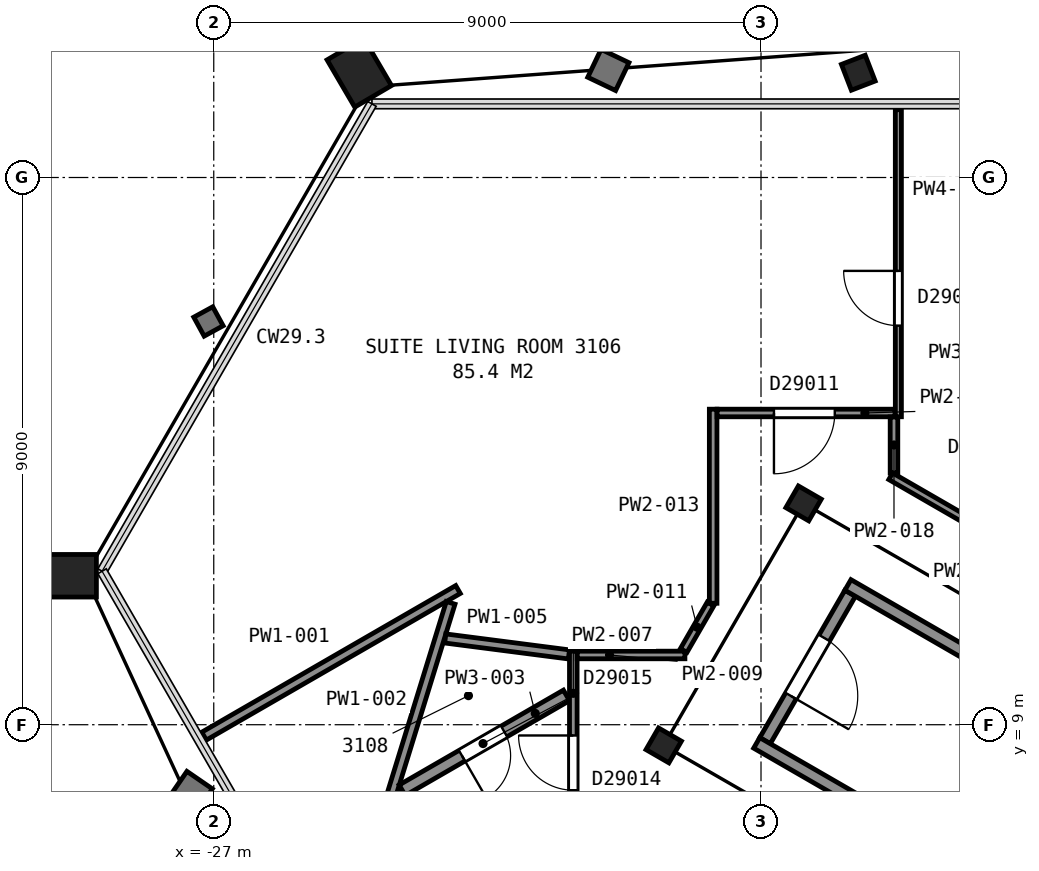
"""IFC4 building model, lengths in metres.
Left out: names, types, materials, properties, quantities, classifications, styles, units other than length and angle.
Written with IfcOpenShell. Run it as: python <this file> out.ifc"""

import sys

from ifc_helpers import new_model, si_unit, direction, frame, frame_2d, origin, origin_2d, place, context, subcontext, project, spatial, rectangle, hollow_rectangle, i_section, extrude, element, fill, save


model = new_model("IFC4")
c1 = context("Model", 3, precision=1e-05, world=origin(), true_north=direction((0.0, 1.0)))
c2 = subcontext(c1, "Body", "Model", "MODEL_VIEW")
j1 = project(units=[si_unit("LENGTHUNIT", "METRE"), si_unit("PLANEANGLEUNIT", "RADIAN")], contexts=[c1])
p1 = place(None, origin())
s1 = spatial("IfcSite", under=j1, at=p1, CompositionType="ELEMENT")
p2 = place(p1, origin())
s2 = spatial("IfcBuilding", under=s1, at=p2, CompositionType="ELEMENT")
p3 = place(p2, frame((0.0, 0.0, 128.8)))
s3 = spatial("IfcBuildingStorey", under=s2, at=p3, CompositionType="ELEMENT", Elevation=128.8)
p4 = place(p3, frame((-16.313, 19.498, 0.04), z_axis=(-0.073399283301, 0.190322100919, 0.978973974686), x_axis=(0.997200375036, -5.0957711e-05, 0.074775727554)))
e1 = element("IfcColumn", 1, at=p4, inside=s3, PredefinedType="COLUMN", context=c2, shape_type="SweptSolid", body=[
    extrude(i_section(OverallWidth=0.419, OverallDepth=0.455, WebThickness=0.042, FlangeThickness=0.068, FilletRadius=0.015, at=origin_2d()), origin(), (0.0, 0.0, 1.0), 3.596),
])
p5 = place(p3, frame((-24.479, 19.505, 0.075), z_axis=(-0.111147334109, 0.189640824097, 0.975542222539), x_axis=(0.49667863065, 0.860838994328, -0.110754519997)))
e2 = element("IfcColumn", 2, at=p5, inside=s3, PredefinedType="COLUMN", context=c2, shape_type="SweptSolid", body=[
    extrude(hollow_rectangle(XDim=0.7, YDim=0.9, WallThickness=0.065, at=origin_2d()), origin(), (0.0, 0.0, 1.0), 3.536),
])
p6 = place(p3, frame((-29.127, 11.45, 0.075), z_axis=(-0.219480980807, 0.0, 0.975616778794), x_axis=(0.496869692208, 0.860596286786, 0.111778978949)))
e3 = element("IfcColumn", 3, at=p6, inside=s3, PredefinedType="COLUMN", context=c2, shape_type="SweptSolid", body=[
    extrude(hollow_rectangle(XDim=0.7, YDim=0.9, WallThickness=0.065, at=origin_2d()), origin(), (0.0, 0.0, 1.0), 3.536),
])
for number, where, z_axis, x_axis in (
    (4, (-17.3, 12.64, 0.0), (0.0, 0.0, 1.0), (0.5, 0.866, 0.0)),
    (5, (-19.6, 8.66, 0.0), (0.0, 0.0, 1.0), (0.5, 0.866, 0.0)),
):
    element("IfcColumn", number, at=place(p3, frame(where, z_axis=z_axis, x_axis=x_axis)), inside=s3, PredefinedType="COLUMN", context=c2, shape_type="SweptSolid", body=[
        extrude(i_section(OverallWidth=0.411, OverallDepth=0.434, WebThickness=0.036, FlangeThickness=0.057, FilletRadius=0.015, at=origin_2d()), origin(), (0.0, 0.0, 1.0), 3.6),
    ])
p7 = place(p3, frame((-16.534, 11.162, 0.0), z_axis=(0.0, 0.0, 1.0), x_axis=(-0.49998411664, -0.866034573852, 0.0)))
e6 = element("IfcWall", 6, at=p7, inside=s3, PredefinedType="PARTITIONING", context=c2, shape_type="SweptSolid", body=[
    extrude(rectangle(XDim=2.8, YDim=0.2, at=frame_2d((1.4, 0.0))), origin(), (0.0, 0.0, 1.0), 3.35),
])
p8 = place(p7, frame((0.85, 0.0, 0.0)))
e7 = element("IfcOpeningElement", 7, at=p8, cuts=e6, PredefinedType="OPENING", context=c2, shape_type="SweptSolid", body=[
    extrude(rectangle(XDim=1.1, YDim=2.1, at=frame_2d((0.55, 1.05))), frame((0.0, 0.11, 0.0), z_axis=(0.0, -1.0, 0.0), x_axis=(1.0, 0.0, 0.0)), (0.0, 0.0, 1.0), 0.22),
])
for number, where, z_axis, x_axis in (
    (8, (-7.678, 2.701, 0.0), (0.0, 0.0, 1.0), (-0.866, 0.5, 0.0)),
    (9, (-6.178, 5.299, 0.0), (0.0, 0.0, 1.0), (-0.866, 0.5, 0.0)),
):
    element("IfcWall", number, at=place(p3, frame(where, z_axis=z_axis, x_axis=x_axis)), inside=s3, PredefinedType="PARTITIONING", context=c2, shape_type="SweptSolid", body=[
        extrude(rectangle(XDim=12.0, YDim=0.2, at=frame_2d((6.0, 0.0))), origin(), (0.0, 0.0, 1.0), 3.35),
    ])
p9 = place(p3, frame((-27.16, 8.812, 0.0), z_axis=(0.0, 0.0, 1.0), x_axis=(0.866019508262, 0.500010211206, 0.0)))
e10 = element("IfcWall", 10, at=p9, inside=s3, PredefinedType="PARTITIONING", context=c2, shape_type="SweptSolid", body=[
    extrude(rectangle(XDim=4.823, YDim=0.15, at=frame_2d((2.411, 0.0))), origin(), (0.0, 0.0, 1.0), 2.613),
])
p10 = place(p3, frame((-24.087, 7.815, 0.0), z_axis=(0.0, 0.0, 1.0), x_axis=(0.294507330173, 0.955649220412, 0.0)))
e11 = element("IfcWall", 11, at=p10, inside=s3, PredefinedType="PARTITIONING", context=c2, shape_type="SweptSolid", body=[
    extrude(rectangle(XDim=3.337, YDim=0.15, at=frame_2d((1.669, 0.0))), origin(), (0.0, 0.0, 1.0), 2.613),
])
p11 = place(p3, frame((-23.901, 7.923, 0.0), z_axis=(0.0, 0.0, 1.0), x_axis=(0.866072196304, 0.49991894422, 0.0)))
e12 = element("IfcWall", 12, at=p11, inside=s3, PredefinedType="PARTITIONING", context=c2, shape_type="SweptSolid", body=[
    extrude(rectangle(XDim=3.119, YDim=0.2, at=frame_2d((1.56, 0.0))), origin(), (0.0, 0.0, 1.0), 2.613),
])
p12 = place(p11, frame((1.135, 0.0, 0.0)))
e13 = element("IfcOpeningElement", 13, at=p12, cuts=e12, PredefinedType="OPENING", context=c2, shape_type="SweptSolid", body=[
    extrude(rectangle(XDim=0.8, YDim=2.1, at=frame_2d((0.4, 1.05))), frame((0.0, 0.11, 0.0), z_axis=(0.0, -1.0, 0.0), x_axis=(1.0, 0.0, 0.0)), (0.0, 0.0, 1.0), 0.22),
])
p13 = place(p3, frame((-23.193, 10.419, 0.0), z_axis=(0.0, 0.0, 1.0), x_axis=(0.991775429183, -0.127990226455, 0.0)))
e14 = element("IfcWall", 14, at=p13, inside=s3, PredefinedType="PARTITIONING", context=c2, shape_type="SweptSolid", body=[
    extrude(rectangle(XDim=2.051, YDim=0.15, at=frame_2d((1.025, 0.0))), origin(), (0.0, 0.0, 1.0), 2.613),
])
p14 = place(p3, frame((-21.087, 7.111, 0.0), z_axis=(0.0, 0.0, 1.0), x_axis=(0.0, 1.0, 0.0)))
e15 = element("IfcWall", 15, at=p14, inside=s3, PredefinedType="PARTITIONING", context=c2, shape_type="SweptSolid", body=[
    extrude(rectangle(XDim=3.099, YDim=0.125, at=frame_2d((1.549, 0.0))), origin(), (0.0, 0.0, 1.0), 2.613),
])
p15 = place(p14, frame((0.812, 0.0, 0.0)))
e16 = element("IfcOpeningElement", 16, at=p15, cuts=e15, PredefinedType="OPENING", context=c2, shape_type="SweptSolid", body=[
    extrude(rectangle(XDim=0.9, YDim=2.1, at=frame_2d((0.45, 1.05))), frame((0.0, 0.073, 0.0), z_axis=(0.0, -1.0, 0.0), x_axis=(1.0, 0.0, 0.0)), (0.0, 0.0, 1.0), 0.145),
])
p16 = place(p3, frame((-21.022, 10.147, 0.0), z_axis=(0.0, 0.0, 1.0), x_axis=(1.0, 0.0, 0.0)))
e17 = element("IfcWall", 17, at=p16, inside=s3, PredefinedType="PARTITIONING", context=c2, shape_type="SweptSolid", body=[
    extrude(rectangle(XDim=1.771, YDim=0.125, at=frame_2d((0.885, 0.0))), origin(), (0.0, 0.0, 1.0), 2.613),
])
p17 = place(p3, frame((-19.271, 10.221, 0.0), z_axis=(0.0, 0.0, 1.0), x_axis=(0.499881837328, 0.866093614288, 0.0)))
e18 = element("IfcWall", 18, at=p17, inside=s3, PredefinedType="PARTITIONING", context=c2, shape_type="SweptSolid", body=[
    extrude(rectangle(XDim=0.884, YDim=0.125, at=frame_2d((0.442, 0.0))), origin(), (0.0, 0.0, 1.0), 2.613),
])
p18 = place(p3, frame((-18.787, 10.998, 0.0), z_axis=(0.0, 0.0, 1.0), x_axis=(0.0, 1.0, 0.0)))
e19 = element("IfcWall", 19, at=p18, inside=s3, PredefinedType="PARTITIONING", context=c2, shape_type="SweptSolid", body=[
    extrude(rectangle(XDim=3.192, YDim=0.125, at=frame_2d((1.596, 0.0))), origin(), (0.0, 0.0, 1.0), 2.613),
])
p19 = place(p3, frame((-18.722, 14.127, 0.0), z_axis=(0.0, 0.0, 1.0), x_axis=(1.0, 0.0, 0.0)))
e20 = element("IfcWall", 20, at=p19, inside=s3, PredefinedType="PARTITIONING", context=c2, shape_type="SweptSolid", body=[
    extrude(rectangle(XDim=2.927, YDim=0.125, at=frame_2d((1.463, 0.0))), origin(), (0.0, 0.0, 1.0), 2.613),
])
p20 = place(p19, frame((0.935, 0.0, 0.0)))
e21 = element("IfcOpeningElement", 21, at=p20, cuts=e20, PredefinedType="OPENING", context=c2, shape_type="SweptSolid", body=[
    extrude(rectangle(XDim=1.0, YDim=2.1, at=frame_2d((0.5, 1.05))), frame((0.0, 0.073, 0.0), z_axis=(0.0, -1.0, 0.0), x_axis=(1.0, 0.0, 0.0)), (0.0, 0.0, 1.0), 0.145),
])
p21 = place(p3, frame((-15.813, 13.14, 0.0), z_axis=(0.0, 0.0, 1.0), x_axis=(0.0, 1.0, 0.0)))
e22 = element("IfcWall", 22, at=p21, inside=s3, PredefinedType="PARTITIONING", context=c2, shape_type="SweptSolid", body=[
    extrude(rectangle(XDim=0.922, YDim=0.125, at=frame_2d((0.461, 0.0))), origin(), (0.0, 0.0, 1.0), 2.613),
])
p22 = place(p3, frame((-15.867, 13.086, 0.0), z_axis=(0.0, 0.0, 1.0), x_axis=(0.866070231021, -0.499922348909, 0.0)))
e23 = element("IfcWall", 23, at=p22, inside=s3, PredefinedType="PARTITIONING", context=c2, shape_type="SweptSolid", body=[
    extrude(rectangle(XDim=4.088, YDim=0.125, at=frame_2d((2.044, 0.0))), origin(), (0.0, 0.0, 1.0), 2.613),
])
p23 = place(p3, frame((-15.741, 19.115, 0.0), z_axis=(0.0, 0.0, 1.0), x_axis=(0.0, -1.0, 0.0)))
e24 = element("IfcWall", 24, at=p23, inside=s3, PredefinedType="PARTITIONING", context=c2, shape_type="SweptSolid", body=[
    extrude(rectangle(XDim=5.05, YDim=0.1, at=frame_2d((2.525, 0.0))), origin(), (0.0, 0.0, 1.0), 2.613),
])
p24 = place(p23, frame((2.651, 0.0, 0.0)))
e25 = element("IfcOpeningElement", 25, at=p24, cuts=e24, PredefinedType="OPENING", context=c2, shape_type="SweptSolid", body=[
    extrude(rectangle(XDim=0.9, YDim=2.1, at=frame_2d((0.45, 1.05))), frame((0.0, 0.06, 0.0), z_axis=(0.0, -1.0, 0.0), x_axis=(1.0, 0.0, 0.0)), (0.0, 0.0, 1.0), 0.12),
])
p25 = place(p8, origin())
e26 = element("IfcDoor", 26, at=p25, inside=s3, OperationType="SINGLE_SWING_RIGHT", PredefinedType="DOOR", context=c2, shape_type="SweptSolid", body=[
    extrude(rectangle(XDim=1.1, YDim=2.1, at=frame_2d((0.55, 1.05))), frame((0.0, 0.025, 0.0), z_axis=(0.0, -1.0, 0.0), x_axis=(1.0, 0.0, 0.0)), (0.0, 0.0, 1.0), 0.05),
])
fill(e7, e26)
p26 = place(p12, origin())
e27 = element("IfcDoor", 27, at=p26, inside=s3, OperationType="SINGLE_SWING_LEFT", PredefinedType="DOOR", context=c2, shape_type="SweptSolid", body=[
    extrude(rectangle(XDim=0.8, YDim=2.1, at=frame_2d((0.4, 1.05))), frame((0.0, 0.025, 0.0), z_axis=(0.0, -1.0, 0.0), x_axis=(1.0, 0.0, 0.0)), (0.0, 0.0, 1.0), 0.05),
])
fill(e13, e27)
p27 = place(p15, origin())
e28 = element("IfcDoor", 28, at=p27, inside=s3, OperationType="SINGLE_SWING_RIGHT", PredefinedType="DOOR", context=c2, shape_type="SweptSolid", body=[
    extrude(rectangle(XDim=0.9, YDim=2.1, at=frame_2d((0.45, 1.05))), frame((0.0, 0.025, 0.0), z_axis=(0.0, -1.0, 0.0), x_axis=(1.0, 0.0, 0.0)), (0.0, 0.0, 1.0), 0.05),
])
fill(e16, e28)
p28 = place(p20, origin())
e29 = element("IfcDoor", 29, at=p28, inside=s3, OperationType="SINGLE_SWING_LEFT", PredefinedType="DOOR", context=c2, shape_type="SweptSolid", body=[
    extrude(rectangle(XDim=1.0, YDim=2.1, at=frame_2d((0.5, 1.05))), frame((0.0, 0.025, 0.0), z_axis=(0.0, -1.0, 0.0), x_axis=(1.0, 0.0, 0.0)), (0.0, 0.0, 1.0), 0.05),
])
fill(e21, e29)
p29 = place(p24, origin())
e30 = element("IfcDoor", 30, at=p29, inside=s3, OperationType="SINGLE_SWING_LEFT", PredefinedType="DOOR", context=c2, shape_type="SweptSolid", body=[
    extrude(rectangle(XDim=0.9, YDim=2.1, at=frame_2d((0.45, 1.05))), frame((0.0, 0.025, 0.0), z_axis=(0.0, -1.0, 0.0), x_axis=(1.0, 0.0, 0.0)), (0.0, 0.0, 1.0), 0.05),
])
fill(e25, e30)
save(model, sys.argv[1])
